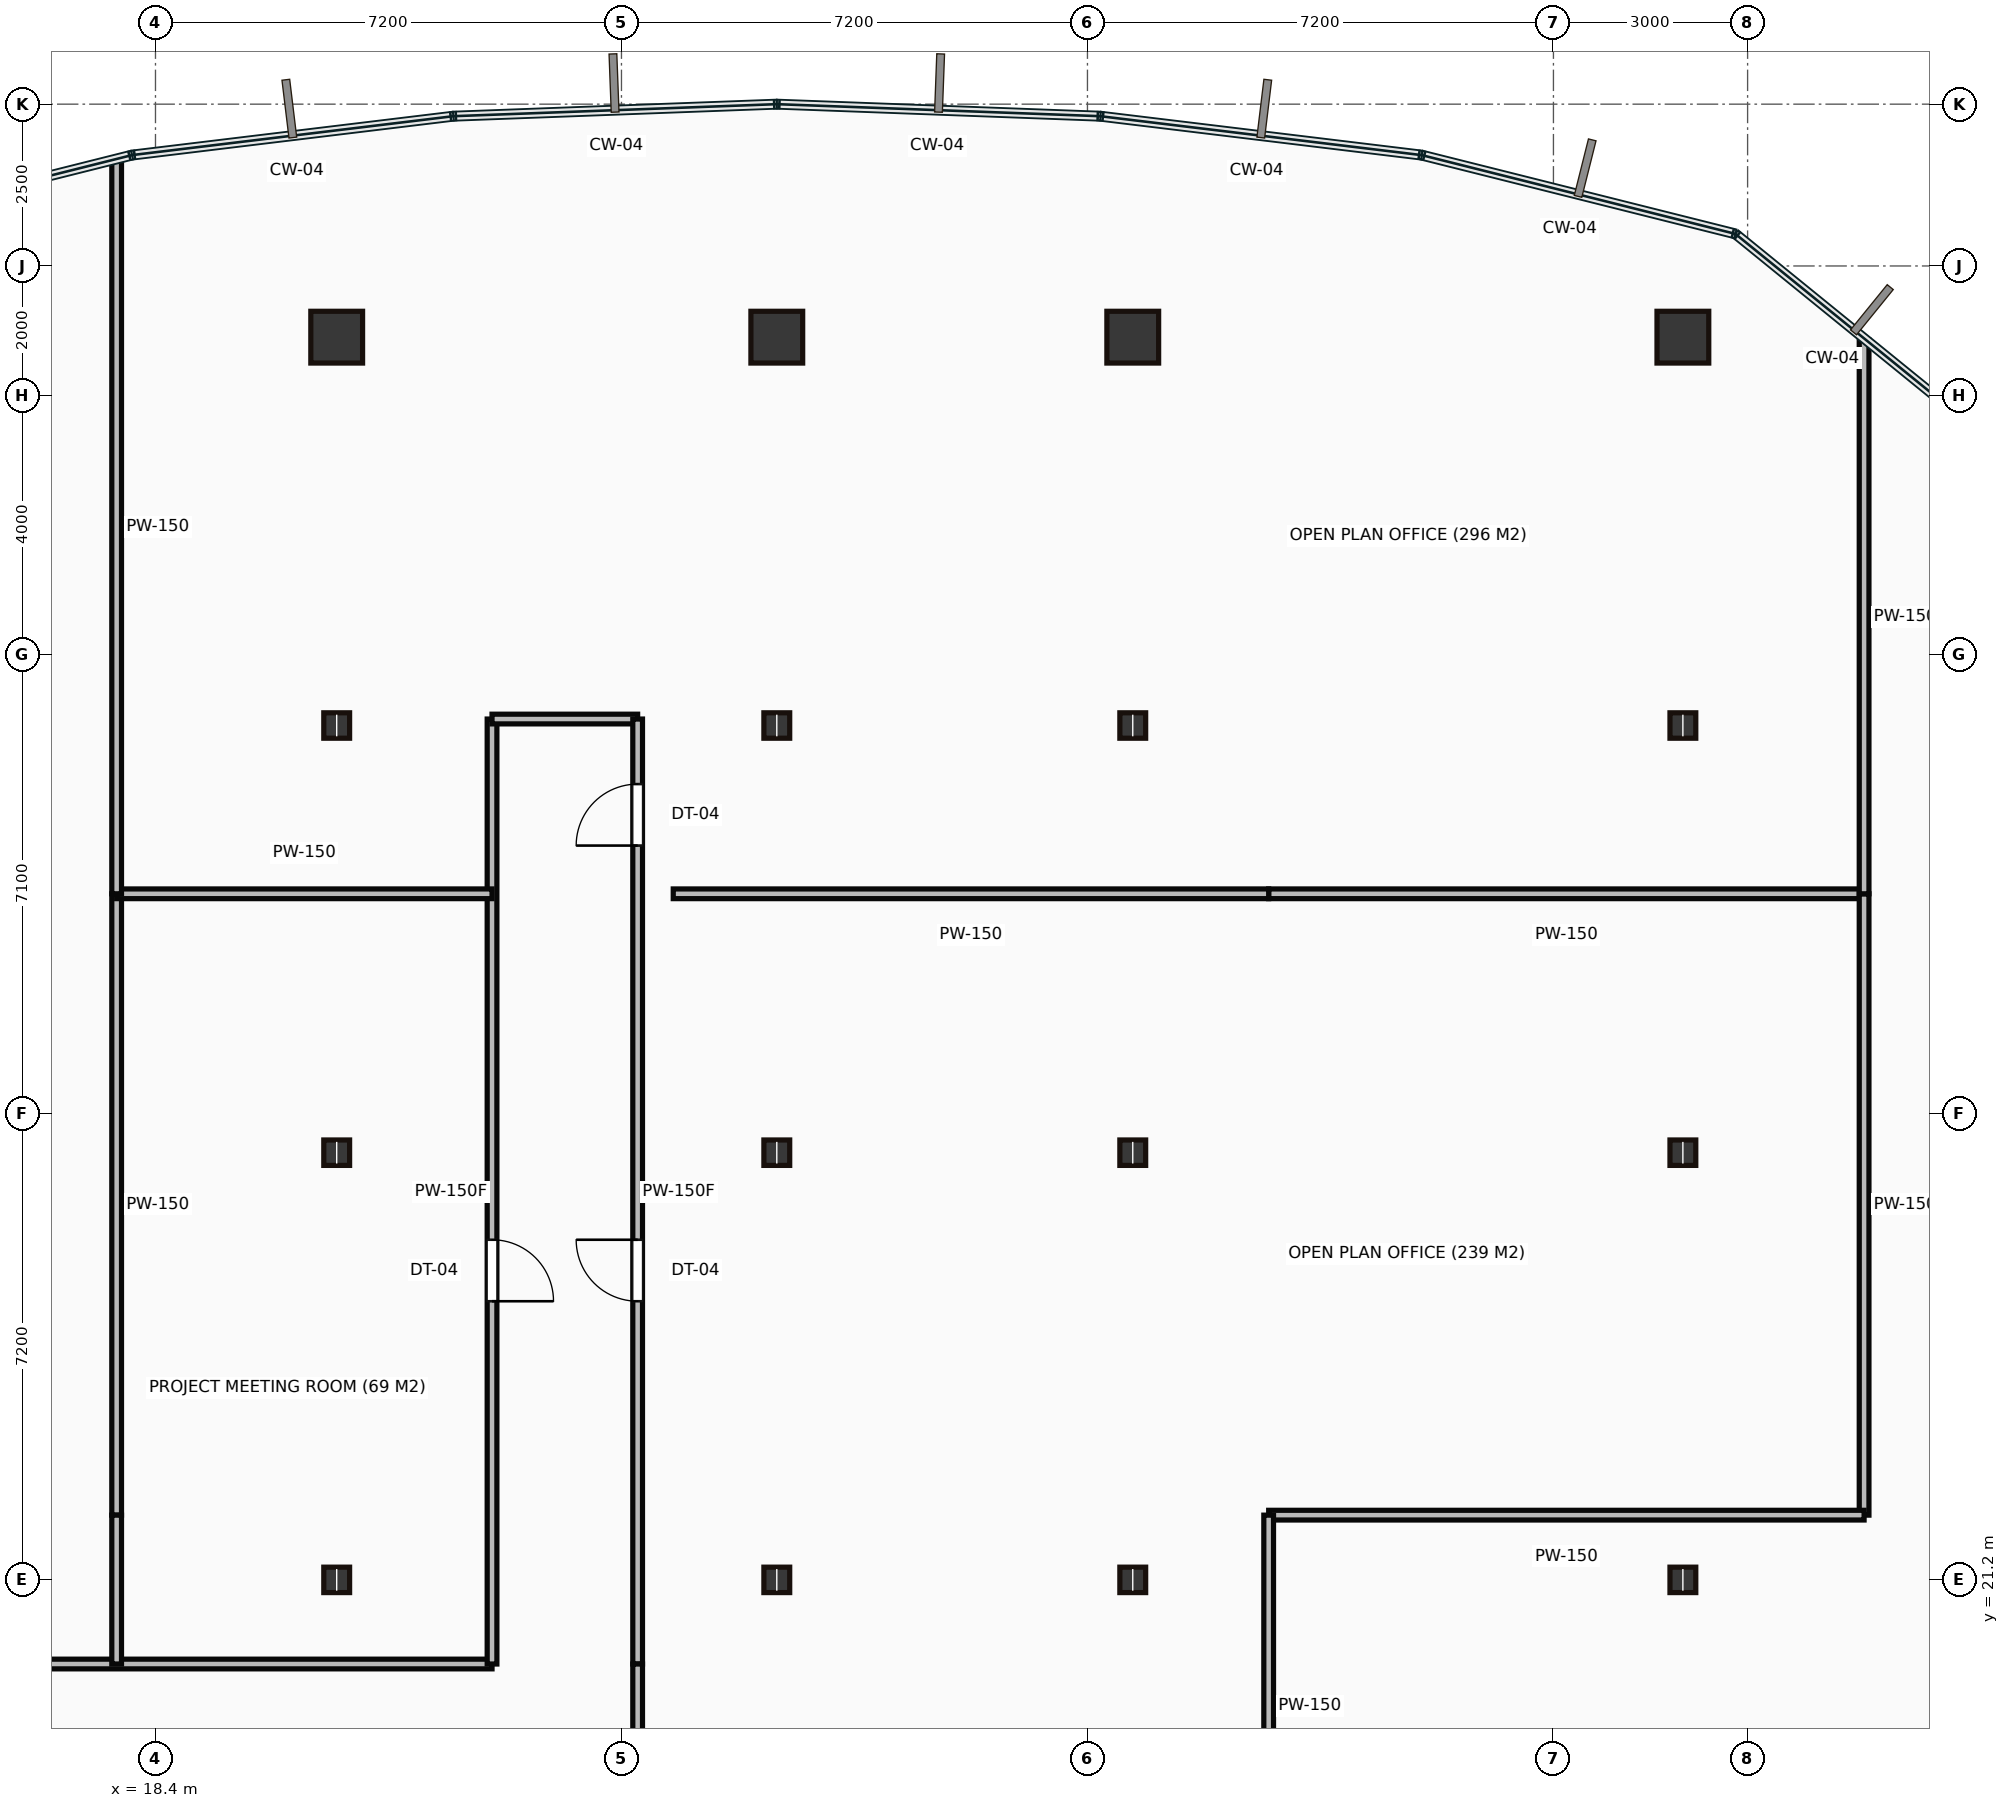
"""IFC4 building model, lengths in metres.
Left out: names, types, materials, properties, quantities, classifications, styles, units other than length and angle.
Written with IfcOpenShell. Run it as: python <this file> out.ifc"""

import sys

from ifc_helpers import new_model, si_unit, direction, frame, frame_2d, origin, origin_2d, place, context, subcontext, project, spatial, rectangle, hollow_rectangle, i_section, extrude, source, transform, mapped, element, fill, save


model = new_model("IFC4")
c1 = context("Model", 3, precision=1e-05, world=origin(), true_north=direction((0.0, 1.0)))
c2 = subcontext(c1, "Body", "Model", "MODEL_VIEW")
j1 = project(units=[si_unit("LENGTHUNIT", "METRE"), si_unit("PLANEANGLEUNIT", "RADIAN")], contexts=[c1])
p1 = place(None, origin())
s1 = spatial("IfcSite", under=j1, at=p1, CompositionType="ELEMENT")
p2 = place(p1, origin())
s2 = spatial("IfcBuilding", under=s1, at=p2, CompositionType="ELEMENT")
p3 = place(p2, frame((0.0, 0.0, 132.45)))
s3 = spatial("IfcBuildingStorey", under=s2, at=p3, CompositionType="ELEMENT", Elevation=132.45)
m1 = source(origin(), c2, "Body", "SweptSolid", [
    extrude(i_section(OverallWidth=0.399, OverallDepth=0.393, WebThickness=0.023, FlangeThickness=0.037, at=origin_2d()), origin(), (0.0, 0.0, 1.0), 3.65),
])
for number, where, z_axis, x_axis in (
    (1, (21.2, 21.2, 0.0), (0.0, 0.0, 1.0), (1.0, 0.0, 0.0)),
    (2, (21.2, 27.8, 0.0), (0.0, 0.0, 1.0), (1.0, 0.0, 0.0)),
    (3, (21.2, 34.4, 0.0), (0.0, 0.0, 1.0), (1.0, 0.0, 0.0)),
):
    element("IfcColumn", number, at=place(p3, frame(where, z_axis=z_axis, x_axis=x_axis)), inside=s3, PredefinedType="COLUMN", context=c2, shape_type="MappedRepresentation", body=[
        mapped(m1, transform((0.0, 0.0, 0.0))),
    ])
m2 = source(origin(), c2, "Body", "SweptSolid", [
    extrude(hollow_rectangle(XDim=0.8, YDim=0.8, WallThickness=0.04, at=origin_2d()), origin(), (0.0, 0.0, 1.0), 3.65),
])
p4 = place(p3, frame((21.2, 40.4, 0.0), z_axis=(0.0, 0.0, 1.0), x_axis=(1.0, 0.0, 0.0)))
e4 = element("IfcColumn", 4, at=p4, inside=s3, PredefinedType="COLUMN", context=c2, shape_type="MappedRepresentation", body=[
    mapped(m2, transform((0.0, 0.0, 0.0))),
])
for number, where, z_axis, x_axis in (
    (5, (28.0, 21.2, 0.0), (0.0, 0.0, 1.0), (1.0, 0.0, 0.0)),
    (6, (28.0, 27.8, 0.0), (0.0, 0.0, 1.0), (1.0, 0.0, 0.0)),
    (7, (28.0, 34.4, 0.0), (0.0, 0.0, 1.0), (1.0, 0.0, 0.0)),
):
    element("IfcColumn", number, at=place(p3, frame(where, z_axis=z_axis, x_axis=x_axis)), inside=s3, PredefinedType="COLUMN", context=c2, shape_type="MappedRepresentation", body=[
        mapped(m1, transform((0.0, 0.0, 0.0))),
    ])
p5 = place(p3, frame((28.0, 40.4, 0.0), z_axis=(0.0, 0.0, 1.0), x_axis=(1.0, 0.0, 0.0)))
e8 = element("IfcColumn", 8, at=p5, inside=s3, PredefinedType="COLUMN", context=c2, shape_type="MappedRepresentation", body=[
    mapped(m2, transform((0.0, 0.0, 0.0))),
])
for number, where, z_axis, x_axis in (
    (9, (33.5, 21.2, 0.0), (0.0, 0.0, 1.0), (1.0, 0.0, 0.0)),
    (10, (33.5, 27.8, 0.0), (0.0, 0.0, 1.0), (1.0, 0.0, 0.0)),
    (11, (33.5, 34.4, 0.0), (0.0, 0.0, 1.0), (1.0, 0.0, 0.0)),
):
    element("IfcColumn", number, at=place(p3, frame(where, z_axis=z_axis, x_axis=x_axis)), inside=s3, PredefinedType="COLUMN", context=c2, shape_type="MappedRepresentation", body=[
        mapped(m1, transform((0.0, 0.0, 0.0))),
    ])
p6 = place(p3, frame((33.5, 40.4, 0.0), z_axis=(0.0, 0.0, 1.0), x_axis=(1.0, 0.0, 0.0)))
e12 = element("IfcColumn", 12, at=p6, inside=s3, PredefinedType="COLUMN", context=c2, shape_type="MappedRepresentation", body=[
    mapped(m2, transform((0.0, 0.0, 0.0))),
])
for number, where, z_axis, x_axis in (
    (13, (42.0, 21.2, 0.0), (0.0, 0.0, 1.0), (1.0, 0.0, 0.0)),
    (14, (42.0, 27.8, 0.0), (0.0, 0.0, 1.0), (1.0, 0.0, 0.0)),
    (15, (42.0, 34.4, 0.0), (0.0, 0.0, 1.0), (1.0, 0.0, 0.0)),
):
    element("IfcColumn", number, at=place(p3, frame(where, z_axis=z_axis, x_axis=x_axis)), inside=s3, PredefinedType="COLUMN", context=c2, shape_type="MappedRepresentation", body=[
        mapped(m1, transform((0.0, 0.0, 0.0))),
    ])
p7 = place(p3, frame((42.0, 40.4, 0.0), z_axis=(0.0, 0.0, 1.0), x_axis=(1.0, 0.0, 0.0)))
e16 = element("IfcColumn", 16, at=p7, inside=s3, PredefinedType="COLUMN", context=c2, shape_type="MappedRepresentation", body=[
    mapped(m2, transform((0.0, 0.0, 0.0))),
])
m3 = source(origin(), c2, "Body", "SweptSolid", [
    extrude(rectangle(XDim=19.0, YDim=0.15, at=frame_2d((9.5, 0.0))), origin(), (0.0, 0.0, 1.0), 3.35),
])
p8 = place(p3, frame((4.6, 19.9, 0.0), z_axis=(0.0, 0.0, 1.0), x_axis=(1.0, 0.0, 0.0)))
e17 = element("IfcWall", 17, at=p8, inside=s3, PredefinedType="PARTITIONING", context=c2, shape_type="MappedRepresentation", body=[
    mapped(m3, transform((0.0, 0.0, 0.0))),
])
m4 = source(origin(), c2, "Body", "SweptSolid", [
    extrude(rectangle(XDim=14.6, YDim=0.15, at=frame_2d((7.3, 0.0))), origin(), (0.0, 0.0, 1.0), 3.35),
])
p9 = place(p3, frame((23.6, 19.9, 0.0), z_axis=(0.0, 0.0, 1.0), x_axis=(0.0, 1.0, 0.0)))
e18 = element("IfcWall", 18, at=p9, inside=s3, PredefinedType="PARTITIONING", context=c2, shape_type="MappedRepresentation", body=[
    mapped(m4, transform((0.0, 0.0, 0.0))),
])
p10 = place(p9, frame((5.605, 0.0, 0.0)))
e19 = element("IfcOpeningElement", 19, at=p10, cuts=e18, PredefinedType="OPENING", context=c2, shape_type="SweptSolid", body=[
    extrude(rectangle(XDim=0.95, YDim=2.15, at=frame_2d((0.475, 1.075))), frame((0.0, 0.085, 0.0), z_axis=(0.0, -1.0, 0.0), x_axis=(1.0, 0.0, 0.0)), (0.0, 0.0, 1.0), 0.17),
])
m5 = source(origin(), c2, "Body", "SweptSolid", [
    extrude(rectangle(XDim=2.25, YDim=0.15, at=frame_2d((1.125, 0.0))), origin(), (0.0, 0.0, 1.0), 2.652),
])
p11 = place(p3, frame((23.6, 34.5, 0.0), z_axis=(0.0, 0.0, 1.0), x_axis=(1.0, 0.0, 0.0)))
e20 = element("IfcWall", 20, at=p11, inside=s3, PredefinedType="PARTITIONING", context=c2, shape_type="MappedRepresentation", body=[
    mapped(m5, transform((0.0, 0.0, 0.0))),
])
p12 = place(p3, frame((25.85, 34.5, 0.0), z_axis=(0.0, 0.0, 1.0), x_axis=(0.0, -1.0, 0.0)))
e21 = element("IfcWall", 21, at=p12, inside=s3, PredefinedType="PARTITIONING", context=c2, shape_type="MappedRepresentation", body=[
    mapped(m4, transform((0.0, 0.0, 0.0))),
])
p13 = place(p12, frame((1.005, 0.0, 0.0)))
e22 = element("IfcOpeningElement", 22, at=p13, cuts=e21, PredefinedType="OPENING", context=c2, shape_type="SweptSolid", body=[
    extrude(rectangle(XDim=0.95, YDim=2.15, at=frame_2d((0.475, 1.075))), frame((0.0, 0.085, 0.0), z_axis=(0.0, -1.0, 0.0), x_axis=(1.0, 0.0, 0.0)), (0.0, 0.0, 1.0), 0.17),
])
p14 = place(p12, frame((8.045, 0.0, 0.0)))
e23 = element("IfcOpeningElement", 23, at=p14, cuts=e21, PredefinedType="OPENING", context=c2, shape_type="SweptSolid", body=[
    extrude(rectangle(XDim=0.95, YDim=2.15, at=frame_2d((0.475, 1.075))), frame((0.0, 0.085, 0.0), z_axis=(0.0, -1.0, 0.0), x_axis=(1.0, 0.0, 0.0)), (0.0, 0.0, 1.0), 0.17),
])
m6 = source(origin(), c2, "Body", "SweptSolid", [
    extrude(rectangle(XDim=2.1, YDim=0.15, at=frame_2d((1.05, 0.0))), origin(), (0.0, 0.0, 1.0), 3.35),
])
p15 = place(p3, frame((25.85, 19.9, 0.0), z_axis=(0.0, 0.0, 1.0), x_axis=(0.0, -1.0, 0.0)))
e24 = element("IfcWall", 24, at=p15, inside=s3, PredefinedType="PARTITIONING", context=c2, shape_type="MappedRepresentation", body=[
    mapped(m6, transform((0.0, 0.0, 0.0))),
])
m7 = source(origin(), c2, "Body", "SweptSolid", [
    extrude(rectangle(XDim=9.6, YDim=0.15, at=frame_2d((4.8, 0.0))), origin(), (0.0, 0.0, 1.0), 3.35),
])
p16 = place(p3, frame((17.8, 31.8, 0.0), z_axis=(0.0, 0.0, 1.0), x_axis=(0.0, -1.0, 0.0)))
e25 = element("IfcWall", 25, at=p16, inside=s3, PredefinedType="PARTITIONING", context=c2, shape_type="MappedRepresentation", body=[
    mapped(m7, transform((0.0, 0.0, 0.0))),
])
m8 = source(origin(), c2, "Body", "SweptSolid", [
    extrude(rectangle(XDim=2.3, YDim=0.15, at=frame_2d((1.15, 0.0))), origin(), (0.0, 0.0, 1.0), 3.35),
])
p17 = place(p3, frame((17.8, 22.2, 0.0), z_axis=(0.0, 0.0, 1.0), x_axis=(0.0, -1.0, 0.0)))
e26 = element("IfcWall", 26, at=p17, inside=s3, PredefinedType="PARTITIONING", context=c2, shape_type="MappedRepresentation", body=[
    mapped(m8, transform((0.0, 0.0, 0.0))),
])
m9 = source(origin(), c2, "Body", "SweptSolid", [
    extrude(rectangle(XDim=5.8, YDim=0.15, at=frame_2d((2.9, 0.0))), origin(), (0.0, 0.0, 1.0), 3.35),
])
p18 = place(p3, frame((17.8, 31.8, 0.0), z_axis=(0.0, 0.0, 1.0), x_axis=(1.0, 0.0, 0.0)))
e27 = element("IfcWall", 27, at=p18, inside=s3, PredefinedType="PARTITIONING", context=c2, shape_type="MappedRepresentation", body=[
    mapped(m9, transform((0.0, 0.0, 0.0))),
])
m10 = source(origin(), c2, "Body", "SweptSolid", [
    extrude(rectangle(XDim=11.333, YDim=0.15, at=frame_2d((5.667, 0.0))), origin(), (0.0, 0.0, 1.0), 3.35),
])
p19 = place(p3, frame((17.8, 43.133, 0.0), z_axis=(0.0, 0.0, 1.0), x_axis=(0.0, -1.0, 0.0)))
e28 = element("IfcWall", 28, at=p19, inside=s3, PredefinedType="PARTITIONING", context=c2, shape_type="MappedRepresentation", body=[
    mapped(m10, transform((0.0, 0.0, 0.0))),
])
m11 = source(origin(), c2, "Body", "SweptSolid", [
    extrude(rectangle(XDim=9.2, YDim=0.15, at=frame_2d((4.6, 0.0))), origin(), (0.0, 0.0, 1.0), 3.35),
])
p20 = place(p3, frame((44.8, 31.8, 0.0), z_axis=(0.0, 0.0, 1.0), x_axis=(-1.0, 0.0, 0.0)))
e29 = element("IfcWall", 29, at=p20, inside=s3, PredefinedType="PARTITIONING", context=c2, shape_type="MappedRepresentation", body=[
    mapped(m11, transform((0.0, 0.0, 0.0))),
])
m12 = source(origin(), c2, "Body", "SweptSolid", [
    extrude(rectangle(XDim=9.2, YDim=0.15, at=frame_2d((4.6, 0.0))), origin(), (0.0, 0.0, 1.0), 3.35),
])
p21 = place(p3, frame((35.6, 31.8, 0.0), z_axis=(0.0, 0.0, 1.0), x_axis=(-1.0, 0.0, 0.0)))
e30 = element("IfcWall", 30, at=p21, inside=s3, PredefinedType="PARTITIONING", context=c2, shape_type="MappedRepresentation", body=[
    mapped(m12, transform((0.0, 0.0, 0.0))),
])
p22 = place(p3, frame((44.8, 31.8, 0.0), z_axis=(0.0, 0.0, 1.0), x_axis=(0.0, -1.0, 0.0)))
e31 = element("IfcWall", 31, at=p22, inside=s3, PredefinedType="PARTITIONING", context=c2, shape_type="MappedRepresentation", body=[
    mapped(m7, transform((0.0, 0.0, 0.0))),
])
p23 = place(p3, frame((44.8, 22.2, 0.0), z_axis=(0.0, 0.0, 1.0), x_axis=(-1.0, 0.0, 0.0)))
e32 = element("IfcWall", 32, at=p23, inside=s3, PredefinedType="PARTITIONING", context=c2, shape_type="MappedRepresentation", body=[
    mapped(m11, transform((0.0, 0.0, 0.0))),
])
m13 = source(origin(), c2, "Body", "SweptSolid", [
    extrude(rectangle(XDim=5.9, YDim=0.15, at=frame_2d((2.95, 0.0))), origin(), (0.0, 0.0, 1.0), 3.35),
])
p24 = place(p3, frame((35.6, 22.2, 0.0), z_axis=(0.0, 0.0, 1.0), x_axis=(0.0, -1.0, 0.0)))
e33 = element("IfcWall", 33, at=p24, inside=s3, PredefinedType="PARTITIONING", context=c2, shape_type="MappedRepresentation", body=[
    mapped(m13, transform((0.0, 0.0, 0.0))),
])
m14 = source(origin(), c2, "Body", "SweptSolid", [
    extrude(rectangle(XDim=8.555, YDim=0.15, at=frame_2d((4.277, 0.0))), origin(), (0.0, 0.0, 1.0), 3.35),
])
p25 = place(p3, frame((44.8, 40.355, 0.0), z_axis=(0.0, 0.0, 1.0), x_axis=(0.0, -1.0, 0.0)))
e34 = element("IfcWall", 34, at=p25, inside=s3, PredefinedType="PARTITIONING", context=c2, shape_type="MappedRepresentation", body=[
    mapped(m14, transform((0.0, 0.0, 0.0))),
])
m15 = source(origin(), c2, "Body", "SweptSolid", [
    extrude(rectangle(XDim=0.95, YDim=2.15, at=frame_2d((0.475, 1.075))), frame((0.0, 0.025, 0.0), z_axis=(0.0, -1.0, 0.0), x_axis=(1.0, 0.0, 0.0)), (0.0, 0.0, 1.0), 0.05),
])
p26 = place(p10, origin())
e35 = element("IfcDoor", 35, at=p26, inside=s3, OperationType="SINGLE_SWING_LEFT", PredefinedType="DOOR", context=c2, shape_type="MappedRepresentation", body=[
    mapped(m15, transform((0.0, 0.0, 0.0))),
])
fill(e19, e35)
p27 = place(p13, origin())
e36 = element("IfcDoor", 36, at=p27, inside=s3, OperationType="SINGLE_SWING_RIGHT", PredefinedType="DOOR", context=c2, shape_type="MappedRepresentation", body=[
    mapped(m15, transform((0.0, 0.0, 0.0))),
])
fill(e22, e36)
p28 = place(p14, origin())
e37 = element("IfcDoor", 37, at=p28, inside=s3, OperationType="SINGLE_SWING_LEFT", PredefinedType="DOOR", context=c2, shape_type="MappedRepresentation", body=[
    mapped(m15, transform((0.0, 0.0, 0.0))),
])
fill(e23, e37)
save(model, sys.argv[1])
